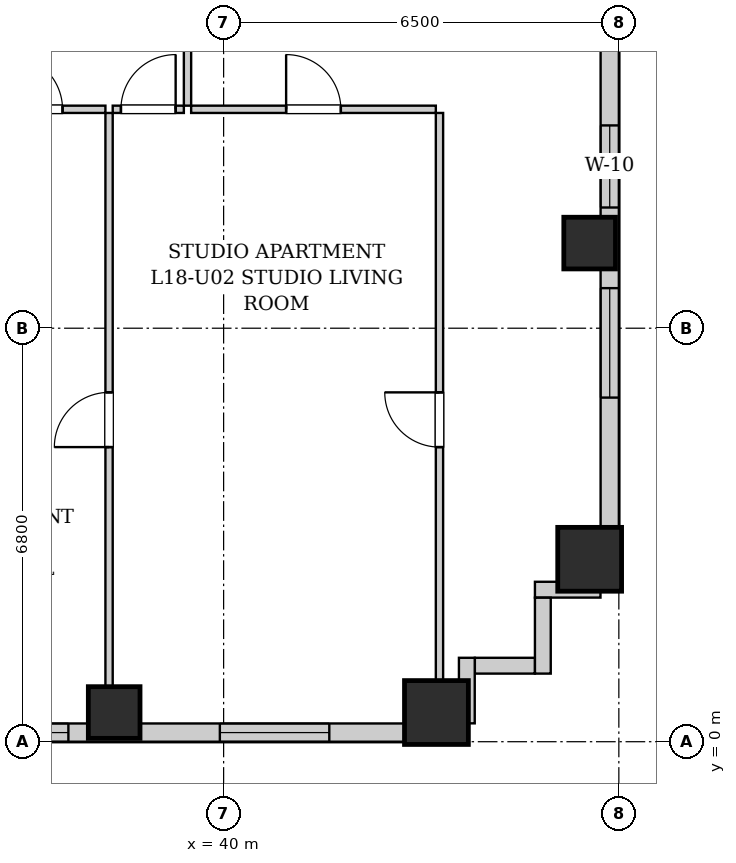
"""IFC4 building model, lengths in metres.
Left out: names, types, materials, properties, quantities, classifications, styles, units other than length and angle.
Written with IfcOpenShell. Run it as: python <this file> out.ifc"""

import sys

from ifc_helpers import new_model, si_unit, direction, frame, frame_2d, origin, origin_2d, place, context, subcontext, project, spatial, rectangle, extrude, element, fill, save


model = new_model("IFC4")
c1 = context("Model", 3, precision=1e-05, world=origin(), true_north=direction((0.0, 1.0)))
c2 = subcontext(c1, "Body", "Model", "MODEL_VIEW")
j1 = project(units=[si_unit("LENGTHUNIT", "METRE"), si_unit("PLANEANGLEUNIT", "RADIAN")], contexts=[c1])
p1 = place(None, origin())
s1 = spatial("IfcSite", under=j1, at=p1, CompositionType="ELEMENT")
p2 = place(p1, origin())
s2 = spatial("IfcBuilding", under=s1, at=p2, CompositionType="ELEMENT")
p3 = place(p2, frame((0.0, 0.0, 67.4)))
s3 = spatial("IfcBuildingStorey", under=s2, at=p3, CompositionType="ELEMENT", Elevation=67.4)
p4 = place(p3, frame((38.2, 0.48, 0.0), z_axis=(0.0, 0.0, 1.0), x_axis=(1.0, 0.0, 0.0)))
e1 = element("IfcColumn", 1, at=p4, inside=s3, PredefinedType="COLUMN", context=c2, shape_type="SweptSolid", body=[
    extrude(rectangle(XDim=0.85, YDim=0.85, at=origin_2d()), origin(), (0.0, 0.0, 1.0), 3.2),
])
for number, where, z_axis, x_axis in (
    (2, (43.5, 0.48, 0.0), (0.0, 0.0, 1.0), (1.0, 0.0, 0.0)),
    (3, (46.02, 3.0, 0.0), (0.0, 0.0, 1.0), (1.0, 0.0, 0.0)),
):
    element("IfcColumn", number, at=place(p3, frame(where, z_axis=z_axis, x_axis=x_axis)), inside=s3, PredefinedType="COLUMN", context=c2, shape_type="SweptSolid", body=[
        extrude(rectangle(XDim=1.05, YDim=1.05, at=origin_2d()), origin(), (0.0, 0.0, 1.0), 3.2),
    ])
p5 = place(p3, frame((46.02, 8.2, 0.0), z_axis=(0.0, 0.0, 1.0), x_axis=(1.0, 0.0, 0.0)))
e4 = element("IfcColumn", 4, at=p5, inside=s3, PredefinedType="COLUMN", context=c2, shape_type="SweptSolid", body=[
    extrude(rectangle(XDim=0.85, YDim=0.85, at=origin_2d()), origin(), (0.0, 0.0, 1.0), 3.2),
])
p6 = place(p3, frame((46.35, 24.6, 0.0), z_axis=(0.0, 0.0, 1.0), x_axis=(0.0, -1.0, 0.0)))
e5 = element("IfcWall", 5, at=p6, inside=s3, PredefinedType="SOLIDWALL", context=c2, shape_type="SweptSolid", body=[
    extrude(rectangle(XDim=22.1, YDim=0.3, at=frame_2d((11.05, 0.0))), origin(), (0.0, 0.0, 1.0), 1.915),
])
p7 = place(p6, frame((17.141, 0.0, 0.55)))
e6 = element("IfcOpeningElement", 6, at=p7, cuts=e5, PredefinedType="OPENING", context=c2, shape_type="SweptSolid", body=[
    extrude(rectangle(XDim=1.8, YDim=1.2, at=frame_2d((0.9, 0.6))), frame((0.0, 0.16, 0.0), z_axis=(0.0, -1.0, 0.0), x_axis=(1.0, 0.0, 0.0)), (0.0, 0.0, 1.0), 0.32),
])
p8 = place(p6, frame((14.465, 0.0, 0.55)))
e7 = element("IfcOpeningElement", 7, at=p8, cuts=e5, PredefinedType="OPENING", context=c2, shape_type="SweptSolid", body=[
    extrude(rectangle(XDim=1.35, YDim=1.2, at=frame_2d((0.675, 0.6))), frame((0.0, 0.16, 0.0), z_axis=(0.0, -1.0, 0.0), x_axis=(1.0, 0.0, 0.0)), (0.0, 0.0, 1.0), 0.32),
])
p9 = place(p3, frame((44.0, 0.15, 0.0), z_axis=(0.0, 0.0, 1.0), x_axis=(-1.0, 0.0, 0.0)))
e8 = element("IfcWall", 8, at=p9, inside=s3, PredefinedType="SOLIDWALL", context=c2, shape_type="SweptSolid", body=[
    extrude(rectangle(XDim=26.35, YDim=0.3, at=frame_2d((13.175, 0.0))), origin(), (0.0, 0.0, 1.0), 1.915),
])
p10 = place(p9, frame((22.665, 0.0, 0.55)))
e9 = element("IfcOpeningElement", 9, at=p10, cuts=e8, PredefinedType="OPENING", context=c2, shape_type="SweptSolid", body=[
    extrude(rectangle(XDim=1.8, YDim=1.2, at=frame_2d((0.9, 0.6))), frame((0.0, 0.16, 0.0), z_axis=(0.0, -1.0, 0.0), x_axis=(1.0, 0.0, 0.0)), (0.0, 0.0, 1.0), 0.32),
])
p11 = place(p9, frame((15.82, 0.0, 0.55)))
e10 = element("IfcOpeningElement", 10, at=p11, cuts=e8, PredefinedType="OPENING", context=c2, shape_type="SweptSolid", body=[
    extrude(rectangle(XDim=0.68, YDim=1.2, at=frame_2d((0.34, 0.6))), frame((0.0, 0.16, 0.0), z_axis=(0.0, -1.0, 0.0), x_axis=(1.0, 0.0, 0.0)), (0.0, 0.0, 1.0), 0.32),
])
p12 = place(p9, frame((13.027, 0.0, 0.55)))
e11 = element("IfcOpeningElement", 11, at=p12, cuts=e8, PredefinedType="OPENING", context=c2, shape_type="SweptSolid", body=[
    extrude(rectangle(XDim=1.8, YDim=1.2, at=frame_2d((0.9, 0.6))), frame((0.0, 0.16, 0.0), z_axis=(0.0, -1.0, 0.0), x_axis=(1.0, 0.0, 0.0)), (0.0, 0.0, 1.0), 0.32),
])
p13 = place(p9, frame((9.365, 0.0, 0.55)))
e12 = element("IfcOpeningElement", 12, at=p13, cuts=e8, PredefinedType="OPENING", context=c2, shape_type="SweptSolid", body=[
    extrude(rectangle(XDim=0.85, YDim=1.2, at=frame_2d((0.425, 0.6))), frame((0.0, 0.16, 0.0), z_axis=(0.0, -1.0, 0.0), x_axis=(1.0, 0.0, 0.0)), (0.0, 0.0, 1.0), 0.32),
])
p14 = place(p9, frame((6.553, 0.0, 0.55)))
e13 = element("IfcOpeningElement", 13, at=p14, cuts=e8, PredefinedType="OPENING", context=c2, shape_type="SweptSolid", body=[
    extrude(rectangle(XDim=1.8, YDim=1.2, at=frame_2d((0.9, 0.6))), frame((0.0, 0.16, 0.0), z_axis=(0.0, -1.0, 0.0), x_axis=(1.0, 0.0, 0.0)), (0.0, 0.0, 1.0), 0.32),
])
p15 = place(p9, frame((2.262, 0.0, 0.55)))
e14 = element("IfcOpeningElement", 14, at=p15, cuts=e8, PredefinedType="OPENING", context=c2, shape_type="SweptSolid", body=[
    extrude(rectangle(XDim=1.8, YDim=1.2, at=frame_2d((0.9, 0.6))), frame((0.0, 0.16, 0.0), z_axis=(0.0, -1.0, 0.0), x_axis=(1.0, 0.0, 0.0)), (0.0, 0.0, 1.0), 0.32),
])
p16 = place(p3, frame((46.198, 2.5, 0.0), z_axis=(0.0, 0.0, 1.0), x_axis=(-1.0, 0.0, 0.0)))
e15 = element("IfcWall", 15, at=p16, inside=s3, PredefinedType="SOLIDWALL", context=c2, shape_type="SweptSolid", body=[
    extrude(rectangle(XDim=1.078, YDim=0.26, at=frame_2d((0.539, 0.0))), origin(), (0.0, 0.0, 1.0), 2.88),
])
p17 = place(p3, frame((45.25, 2.368, 0.0), z_axis=(0.0, 0.0, 1.0), x_axis=(0.0, -1.0, 0.0)))
e16 = element("IfcWall", 16, at=p17, inside=s3, PredefinedType="SOLIDWALL", context=c2, shape_type="SweptSolid", body=[
    extrude(rectangle(XDim=1.248, YDim=0.26, at=frame_2d((0.624, 0.0))), origin(), (0.0, 0.0, 1.0), 2.88),
])
p18 = place(p3, frame((45.118, 1.25, 0.0), z_axis=(0.0, 0.0, 1.0), x_axis=(-1.0, 0.0, 0.0)))
e17 = element("IfcWall", 17, at=p18, inside=s3, PredefinedType="SOLIDWALL", context=c2, shape_type="SweptSolid", body=[
    extrude(rectangle(XDim=0.986, YDim=0.26, at=frame_2d((0.493, 0.0))), origin(), (0.0, 0.0, 1.0), 2.88),
])
p19 = place(p3, frame((44.0, 1.38, 0.0), z_axis=(0.0, 0.0, 1.0), x_axis=(0.0, -1.0, 0.0)))
e18 = element("IfcWall", 18, at=p19, inside=s3, PredefinedType="SOLIDWALL", context=c2, shape_type="SweptSolid", body=[
    extrude(rectangle(XDim=1.078, YDim=0.26, at=frame_2d((0.539, 0.0))), origin(), (0.0, 0.0, 1.0), 2.88),
])
p20 = place(p3, frame((39.406, 10.46, 0.0), z_axis=(0.0, 0.0, 1.0), x_axis=(0.0, 1.0, 0.0)))
e19 = element("IfcWall", 19, at=p20, inside=s3, PredefinedType="PARTITIONING", context=c2, shape_type="SweptSolid", body=[
    extrude(rectangle(XDim=2.85, YDim=0.12, at=frame_2d((1.425, 0.0))), origin(), (0.0, 0.0, 1.0), 2.88),
])
p21 = place(p20, frame((0.975, 0.0, 0.0)))
e20 = element("IfcOpeningElement", 20, at=p21, cuts=e19, PredefinedType="OPENING", context=c2, shape_type="SweptSolid", body=[
    extrude(rectangle(XDim=0.9, YDim=2.05, at=frame_2d((0.45, 1.025))), frame((0.0, 0.07, 0.0), z_axis=(0.0, -1.0, 0.0), x_axis=(1.0, 0.0, 0.0)), (0.0, 0.0, 1.0), 0.14),
])
p22 = place(p3, frame((35.746, 10.4, 0.0), z_axis=(0.0, 0.0, 1.0), x_axis=(1.0, 0.0, 0.0)))
e21 = element("IfcWall", 21, at=p22, inside=s3, PredefinedType="PARTITIONING", context=c2, shape_type="SweptSolid", body=[
    extrude(rectangle(XDim=2.31, YDim=0.12, at=frame_2d((1.155, 0.0))), origin(), (0.0, 0.0, 1.0), 2.88),
])
p23 = place(p22, frame((0.705, 0.0, 0.0)))
e22 = element("IfcOpeningElement", 22, at=p23, cuts=e21, PredefinedType="OPENING", context=c2, shape_type="SweptSolid", body=[
    extrude(rectangle(XDim=0.9, YDim=2.05, at=frame_2d((0.45, 1.025))), frame((0.0, 0.07, 0.0), z_axis=(0.0, -1.0, 0.0), x_axis=(1.0, 0.0, 0.0)), (0.0, 0.0, 1.0), 0.14),
])
p24 = place(p3, frame((38.176, 10.4, 0.0), z_axis=(0.0, 0.0, 1.0), x_axis=(1.0, 0.0, 0.0)))
e23 = element("IfcWall", 23, at=p24, inside=s3, PredefinedType="PARTITIONING", context=c2, shape_type="SweptSolid", body=[
    extrude(rectangle(XDim=1.17, YDim=0.12, at=frame_2d((0.585, 0.0))), origin(), (0.0, 0.0, 1.0), 2.88),
])
p25 = place(p24, frame((0.135, 0.0, 0.0)))
e24 = element("IfcOpeningElement", 24, at=p25, cuts=e23, PredefinedType="OPENING", context=c2, shape_type="SweptSolid", body=[
    extrude(rectangle(XDim=0.9, YDim=2.05, at=frame_2d((0.45, 1.025))), frame((0.0, 0.07, 0.0), z_axis=(0.0, -1.0, 0.0), x_axis=(1.0, 0.0, 0.0)), (0.0, 0.0, 1.0), 0.14),
])
p26 = place(p3, frame((39.466, 10.4, 0.0), z_axis=(0.0, 0.0, 1.0), x_axis=(1.0, 0.0, 0.0)))
e25 = element("IfcWall", 25, at=p26, inside=s3, PredefinedType="PARTITIONING", context=c2, shape_type="SweptSolid", body=[
    extrude(rectangle(XDim=4.024, YDim=0.12, at=frame_2d((2.012, 0.0))), origin(), (0.0, 0.0, 1.0), 2.88),
])
p27 = place(p26, frame((1.562, 0.0, 0.0)))
e26 = element("IfcOpeningElement", 26, at=p27, cuts=e25, PredefinedType="OPENING", context=c2, shape_type="SweptSolid", body=[
    extrude(rectangle(XDim=0.9, YDim=2.05, at=frame_2d((0.45, 1.025))), frame((0.0, 0.07, 0.0), z_axis=(0.0, -1.0, 0.0), x_axis=(1.0, 0.0, 0.0)), (0.0, 0.0, 1.0), 0.14),
])
p28 = place(p3, frame((38.116, 0.28, 0.0), z_axis=(0.0, 0.0, 1.0), x_axis=(0.0, 1.0, 0.0)))
e27 = element("IfcWall", 27, at=p28, inside=s3, PredefinedType="PARTITIONING", context=c2, shape_type="SweptSolid", body=[
    extrude(rectangle(XDim=10.06, YDim=0.12, at=frame_2d((5.03, 0.0))), origin(), (0.0, 0.0, 1.0), 2.88),
])
p29 = place(p28, frame((4.565, 0.0, 0.0)))
e28 = element("IfcOpeningElement", 28, at=p29, cuts=e27, PredefinedType="OPENING", context=c2, shape_type="SweptSolid", body=[
    extrude(rectangle(XDim=0.9, YDim=2.05, at=frame_2d((0.45, 1.025))), frame((0.0, 0.07, 0.0), z_axis=(0.0, -1.0, 0.0), x_axis=(1.0, 0.0, 0.0)), (0.0, 0.0, 1.0), 0.14),
])
p30 = place(p3, frame((43.55, 0.28, 0.0), z_axis=(0.0, 0.0, 1.0), x_axis=(0.0, 1.0, 0.0)))
e29 = element("IfcWall", 29, at=p30, inside=s3, PredefinedType="PARTITIONING", context=c2, shape_type="SweptSolid", body=[
    extrude(rectangle(XDim=10.06, YDim=0.12, at=frame_2d((5.03, 0.0))), origin(), (0.0, 0.0, 1.0), 2.88),
])
p31 = place(p30, frame((4.565, 0.0, 0.0)))
e30 = element("IfcOpeningElement", 30, at=p31, cuts=e29, PredefinedType="OPENING", context=c2, shape_type="SweptSolid", body=[
    extrude(rectangle(XDim=0.9, YDim=2.05, at=frame_2d((0.45, 1.025))), frame((0.0, 0.07, 0.0), z_axis=(0.0, -1.0, 0.0), x_axis=(1.0, 0.0, 0.0)), (0.0, 0.0, 1.0), 0.14),
])
p32 = place(p23, origin())
e31 = element("IfcDoor", 31, at=p32, inside=s3, OperationType="SINGLE_SWING_LEFT", PredefinedType="DOOR", context=c2, shape_type="SweptSolid", body=[
    extrude(rectangle(XDim=0.9, YDim=2.05, at=frame_2d((0.45, 1.025))), frame((0.0, 0.025, 0.0), z_axis=(0.0, -1.0, 0.0), x_axis=(1.0, 0.0, 0.0)), (0.0, 0.0, 1.0), 0.05),
])
fill(e22, e31)
p33 = place(p25, origin())
e32 = element("IfcDoor", 32, at=p33, inside=s3, OperationType="SINGLE_SWING_RIGHT", PredefinedType="DOOR", context=c2, shape_type="SweptSolid", body=[
    extrude(rectangle(XDim=0.9, YDim=2.05, at=frame_2d((0.45, 1.025))), frame((0.0, 0.025, 0.0), z_axis=(0.0, -1.0, 0.0), x_axis=(1.0, 0.0, 0.0)), (0.0, 0.0, 1.0), 0.05),
])
fill(e24, e32)
p34 = place(p27, origin())
e33 = element("IfcDoor", 33, at=p34, inside=s3, OperationType="SINGLE_SWING_LEFT", PredefinedType="DOOR", context=c2, shape_type="SweptSolid", body=[
    extrude(rectangle(XDim=0.9, YDim=2.05, at=frame_2d((0.45, 1.025))), frame((0.0, 0.025, 0.0), z_axis=(0.0, -1.0, 0.0), x_axis=(1.0, 0.0, 0.0)), (0.0, 0.0, 1.0), 0.05),
])
fill(e26, e33)
p35 = place(p29, origin())
e34 = element("IfcDoor", 34, at=p35, inside=s3, OperationType="SINGLE_SWING_LEFT", PredefinedType="DOOR", context=c2, shape_type="SweptSolid", body=[
    extrude(rectangle(XDim=0.9, YDim=2.05, at=frame_2d((0.45, 1.025))), frame((0.0, 0.025, 0.0), z_axis=(0.0, -1.0, 0.0), x_axis=(1.0, 0.0, 0.0)), (0.0, 0.0, 1.0), 0.05),
])
fill(e28, e34)
p36 = place(p31, origin())
e35 = element("IfcDoor", 35, at=p36, inside=s3, OperationType="SINGLE_SWING_RIGHT", PredefinedType="DOOR", context=c2, shape_type="SweptSolid", body=[
    extrude(rectangle(XDim=0.9, YDim=2.05, at=frame_2d((0.45, 1.025))), frame((0.0, 0.025, 0.0), z_axis=(0.0, -1.0, 0.0), x_axis=(1.0, 0.0, 0.0)), (0.0, 0.0, 1.0), 0.05),
])
fill(e30, e35)
p37 = place(p14, origin())
e36 = element("IfcWindow", 36, at=p37, inside=s3, PartitioningType="DOUBLE_PANEL_VERTICAL", PredefinedType="WINDOW", context=c2, shape_type="SweptSolid", body=[
    extrude(rectangle(XDim=1.8, YDim=1.2, at=frame_2d((0.9, 0.6))), frame((0.0, 0.03, 0.0), z_axis=(0.0, -1.0, 0.0), x_axis=(1.0, 0.0, 0.0)), (0.0, 0.0, 1.0), 0.06),
])
fill(e13, e36)
p38 = place(p15, origin())
e37 = element("IfcWindow", 37, at=p38, inside=s3, PartitioningType="DOUBLE_PANEL_VERTICAL", PredefinedType="WINDOW", context=c2, shape_type="SweptSolid", body=[
    extrude(rectangle(XDim=1.8, YDim=1.2, at=frame_2d((0.9, 0.6))), frame((0.0, 0.03, 0.0), z_axis=(0.0, -1.0, 0.0), x_axis=(1.0, 0.0, 0.0)), (0.0, 0.0, 1.0), 0.06),
])
fill(e14, e37)
p39 = place(p7, origin())
e38 = element("IfcWindow", 38, at=p39, inside=s3, PartitioningType="DOUBLE_PANEL_VERTICAL", PredefinedType="WINDOW", context=c2, shape_type="SweptSolid", body=[
    extrude(rectangle(XDim=1.8, YDim=1.2, at=frame_2d((0.9, 0.6))), frame((0.0, 0.03, 0.0), z_axis=(0.0, -1.0, 0.0), x_axis=(1.0, 0.0, 0.0)), (0.0, 0.0, 1.0), 0.06),
])
fill(e6, e38)
p40 = place(p8, origin())
e39 = element("IfcWindow", 39, at=p40, inside=s3, PartitioningType="SINGLE_PANEL", PredefinedType="WINDOW", context=c2, shape_type="SweptSolid", body=[
    extrude(rectangle(XDim=1.35, YDim=1.2, at=frame_2d((0.675, 0.6))), frame((0.0, 0.03, 0.0), z_axis=(0.0, -1.0, 0.0), x_axis=(1.0, 0.0, 0.0)), (0.0, 0.0, 1.0), 0.06),
])
fill(e7, e39)
save(model, sys.argv[1])
